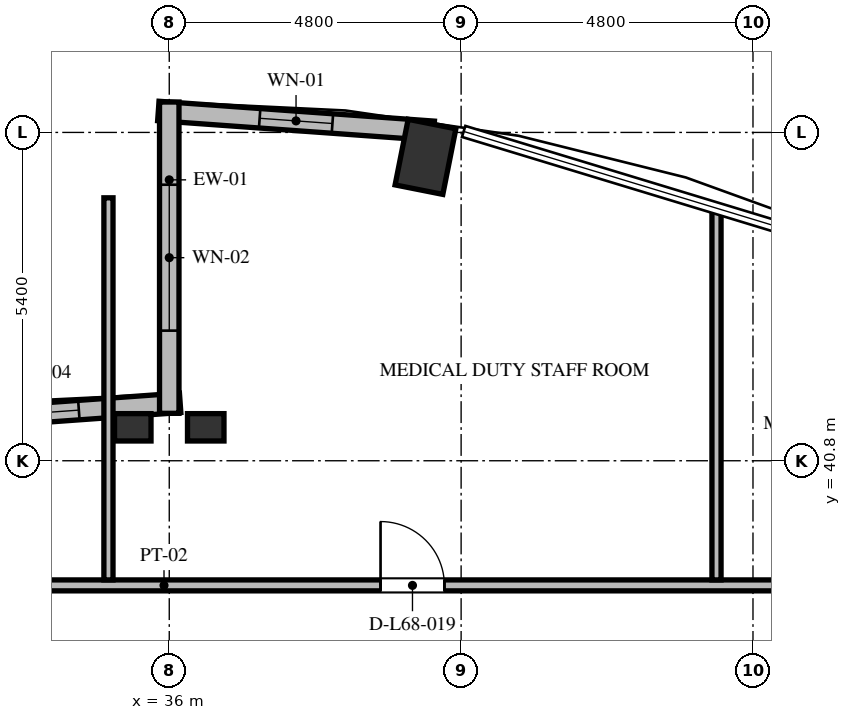
"""IFC4 building model, lengths in metres.
Left out: names, types, materials, properties, quantities, classifications, styles, units other than length and angle.
Written with IfcOpenShell. Run it as: python <this file> out.ifc"""

import sys

from ifc_helpers import new_model, si_unit, direction, frame, frame_2d, origin, origin_2d, place, context, subcontext, project, spatial, rectangle, extrude, element, fill, save


model = new_model("IFC4")
c1 = context("Model", 3, precision=1e-05, world=origin(), true_north=direction((0.0, 1.0)))
c2 = subcontext(c1, "Body", "Model", "MODEL_VIEW")
j1 = project(units=[si_unit("LENGTHUNIT", "METRE"), si_unit("PLANEANGLEUNIT", "RADIAN")], contexts=[c1])
p1 = place(None, origin())
s1 = spatial("IfcSite", under=j1, at=p1, CompositionType="ELEMENT")
p2 = place(p1, origin())
s2 = spatial("IfcBuilding", under=s1, at=p2, CompositionType="ELEMENT")
p3 = place(p2, frame((0.0, 0.0, 262.32)))
s3 = spatial("IfcBuildingStorey", under=s2, at=p3, CompositionType="ELEMENT", Elevation=262.32)
p4 = place(p3, frame((40.214, 45.798, 0.0), z_axis=(0.0, 0.0, 1.0), x_axis=(0.195090322016, 0.980785280403, 0.0)))
e1 = element("IfcColumn", 1, at=p4, inside=s3, PredefinedType="COLUMN", context=c2, shape_type="SweptSolid", body=[
    extrude(rectangle(XDim=1.1, YDim=0.8, at=origin_2d()), origin(), (0.0, 0.0, 1.0), 3.648),
])
for number, where, z_axis, x_axis in (
    (2, (35.4, 41.35, 0.0), (0.0, 0.0, 1.0), (1.0, 0.0, 0.0)),
    (3, (36.6, 41.35, 0.0), (0.0, 0.0, 1.0), (1.0, 0.0, 0.0)),
):
    element("IfcColumn", number, at=place(p3, frame(where, z_axis=z_axis, x_axis=x_axis)), inside=s3, PredefinedType="PILASTER", context=c2, shape_type="SweptSolid", body=[
        extrude(rectangle(XDim=0.6, YDim=0.45, at=origin_2d()), origin(), (0.0, 0.0, 1.0), 3.648),
    ])
p5 = place(p3, frame((40.35, 46.226, 0.0), z_axis=(0.0, 0.0, 1.0), x_axis=(-0.997409061056, 0.071938619141, 0.0)))
e4 = element("IfcWall", 4, at=p5, inside=s3, PredefinedType="SOLIDWALL", context=c2, shape_type="SweptSolid", body=[
    extrude(rectangle(XDim=4.541, YDim=0.32, at=frame_2d((2.271, 0.0))), origin(), (0.0, 0.0, 1.0), 3.448),
])
p6 = place(p5, frame((1.67, 0.0, 0.85)))
e5 = element("IfcOpeningElement", 5, at=p6, cuts=e4, PredefinedType="OPENING", context=c2, shape_type="SweptSolid", body=[
    extrude(rectangle(XDim=1.2, YDim=2.2, at=frame_2d((0.6, 1.1))), frame((0.0, 0.17, 0.0), z_axis=(0.0, -1.0, 0.0), x_axis=(1.0, 0.0, 0.0)), (0.0, 0.0, 1.0), 0.34),
])
p7 = place(p3, frame((36.179, 41.753, 0.0), z_axis=(0.0, 0.0, 1.0), x_axis=(-0.997408782787, -0.071942477163, 0.0)))
e6 = element("IfcWall", 6, at=p7, inside=s3, PredefinedType="SOLIDWALL", context=c2, shape_type="SweptSolid", body=[
    extrude(rectangle(XDim=4.541, YDim=0.32, at=frame_2d((2.27, 0.0))), origin(), (0.0, 0.0, 1.0), 3.448),
])
p8 = place(p7, frame((1.67, 0.0, 0.85)))
e7 = element("IfcOpeningElement", 7, at=p8, cuts=e6, PredefinedType="OPENING", context=c2, shape_type="SweptSolid", body=[
    extrude(rectangle(XDim=1.2, YDim=1.8, at=frame_2d((0.6, 0.9))), frame((0.0, 0.17, 0.0), z_axis=(0.0, -1.0, 0.0), x_axis=(1.0, 0.0, 0.0)), (0.0, 0.0, 1.0), 0.34),
])
p9 = place(p3, frame((36.0, 46.7, 0.0), z_axis=(0.0, 0.0, 1.0), x_axis=(0.0, -1.0, 0.0)))
e8 = element("IfcWall", 8, at=p9, inside=s3, PredefinedType="SOLIDWALL", context=c2, shape_type="SweptSolid", body=[
    extrude(rectangle(XDim=5.12, YDim=0.32, at=frame_2d((2.56, 0.0))), origin(), (0.0, 0.0, 1.0), 3.448),
])
p10 = place(p9, frame((1.36, 0.0, 0.84)))
e9 = element("IfcOpeningElement", 9, at=p10, cuts=e8, PredefinedType="OPENING", context=c2, shape_type="SweptSolid", body=[
    extrude(rectangle(XDim=2.4, YDim=2.04, at=frame_2d((1.2, 1.02))), frame((0.0, 0.17, 0.0), z_axis=(0.0, -1.0, 0.0), x_axis=(1.0, 0.0, 0.0)), (0.0, 0.0, 1.0), 0.34),
])
p11 = place(p3, frame((30.71, 38.75, 0.0), z_axis=(0.0, 0.0, 1.0), x_axis=(1.0, 0.0, 0.0)))
e10 = element("IfcWall", 10, at=p11, inside=s3, PredefinedType="PARTITIONING", context=c2, shape_type="SweptSolid", body=[
    extrude(rectangle(XDim=20.815, YDim=0.18, at=frame_2d((10.408, 0.0))), origin(), (0.0, 0.0, 1.0), 3.073),
])
p12 = place(p11, frame((16.869, 0.0, 0.0)))
e11 = element("IfcOpeningElement", 11, at=p12, cuts=e10, PredefinedType="OPENING", context=c2, shape_type="SweptSolid", body=[
    extrude(rectangle(XDim=1.05, YDim=2.15, at=frame_2d((0.525, 1.075))), frame((0.0, 0.1, 0.0), z_axis=(0.0, -1.0, 0.0), x_axis=(1.0, 0.0, 0.0)), (0.0, 0.0, 1.0), 0.2),
])
p13 = place(p11, frame((8.765, 0.0, 0.0)))
e12 = element("IfcOpeningElement", 12, at=p13, cuts=e10, PredefinedType="OPENING", context=c2, shape_type="SweptSolid", body=[
    extrude(rectangle(XDim=1.05, YDim=2.15, at=frame_2d((0.525, 1.075))), frame((0.0, 0.1, 0.0), z_axis=(0.0, -1.0, 0.0), x_axis=(1.0, 0.0, 0.0)), (0.0, 0.0, 1.0), 0.2),
])
p14 = place(p3, frame((35.0, 38.84, 0.0), z_axis=(0.0, 0.0, 1.0), x_axis=(0.0, 1.0, 0.0)))
e13 = element("IfcWall", 13, at=p14, inside=s3, PredefinedType="PARTITIONING", context=c2, shape_type="SweptSolid", body=[
    extrude(rectangle(XDim=6.284, YDim=0.15, at=frame_2d((3.142, 0.0))), origin(), (0.0, 0.0, 1.0), 3.448),
])
p15 = place(p3, frame((45.0, 38.84, 0.0), z_axis=(0.0, 0.0, 1.0), x_axis=(0.0, 1.0, 0.0)))
e14 = element("IfcWall", 14, at=p15, inside=s3, PredefinedType="PARTITIONING", context=c2, shape_type="SweptSolid", body=[
    extrude(rectangle(XDim=6.097, YDim=0.15, at=frame_2d((3.048, 0.0))), origin(), (0.0, 0.0, 1.0), 3.448),
])
p16 = place(p6, origin())
e15 = element("IfcWindow", 15, at=p16, inside=s3, PartitioningType="SINGLE_PANEL", PredefinedType="WINDOW", context=c2, shape_type="SweptSolid", body=[
    extrude(rectangle(XDim=1.2, YDim=2.2, at=frame_2d((0.6, 1.1))), frame((0.0, 0.03, 0.0), z_axis=(0.0, -1.0, 0.0), x_axis=(1.0, 0.0, 0.0)), (0.0, 0.0, 1.0), 0.06),
])
fill(e5, e15)
p17 = place(p8, origin())
e16 = element("IfcWindow", 16, at=p17, inside=s3, PartitioningType="SINGLE_PANEL", PredefinedType="WINDOW", context=c2, shape_type="SweptSolid", body=[
    extrude(rectangle(XDim=1.2, YDim=1.8, at=frame_2d((0.6, 0.9))), frame((0.0, 0.03, 0.0), z_axis=(0.0, -1.0, 0.0), x_axis=(1.0, 0.0, 0.0)), (0.0, 0.0, 1.0), 0.06),
])
fill(e7, e16)
p18 = place(p10, origin())
e17 = element("IfcWindow", 17, at=p18, inside=s3, PartitioningType="SINGLE_PANEL", PredefinedType="WINDOW", context=c2, shape_type="SweptSolid", body=[
    extrude(rectangle(XDim=2.4, YDim=2.04, at=frame_2d((1.2, 1.02))), frame((0.0, 0.03, 0.0), z_axis=(0.0, -1.0, 0.0), x_axis=(1.0, 0.0, 0.0)), (0.0, 0.0, 1.0), 0.06),
])
fill(e9, e17)
p19 = place(p13, origin())
e18 = element("IfcDoor", 18, at=p19, inside=s3, OperationType="SINGLE_SWING_LEFT", PredefinedType="DOOR", context=c2, shape_type="SweptSolid", body=[
    extrude(rectangle(XDim=1.05, YDim=2.15, at=frame_2d((0.525, 1.075))), frame((0.0, 0.025, 0.0), z_axis=(0.0, -1.0, 0.0), x_axis=(1.0, 0.0, 0.0)), (0.0, 0.0, 1.0), 0.05),
])
fill(e12, e18)
save(model, sys.argv[1])
